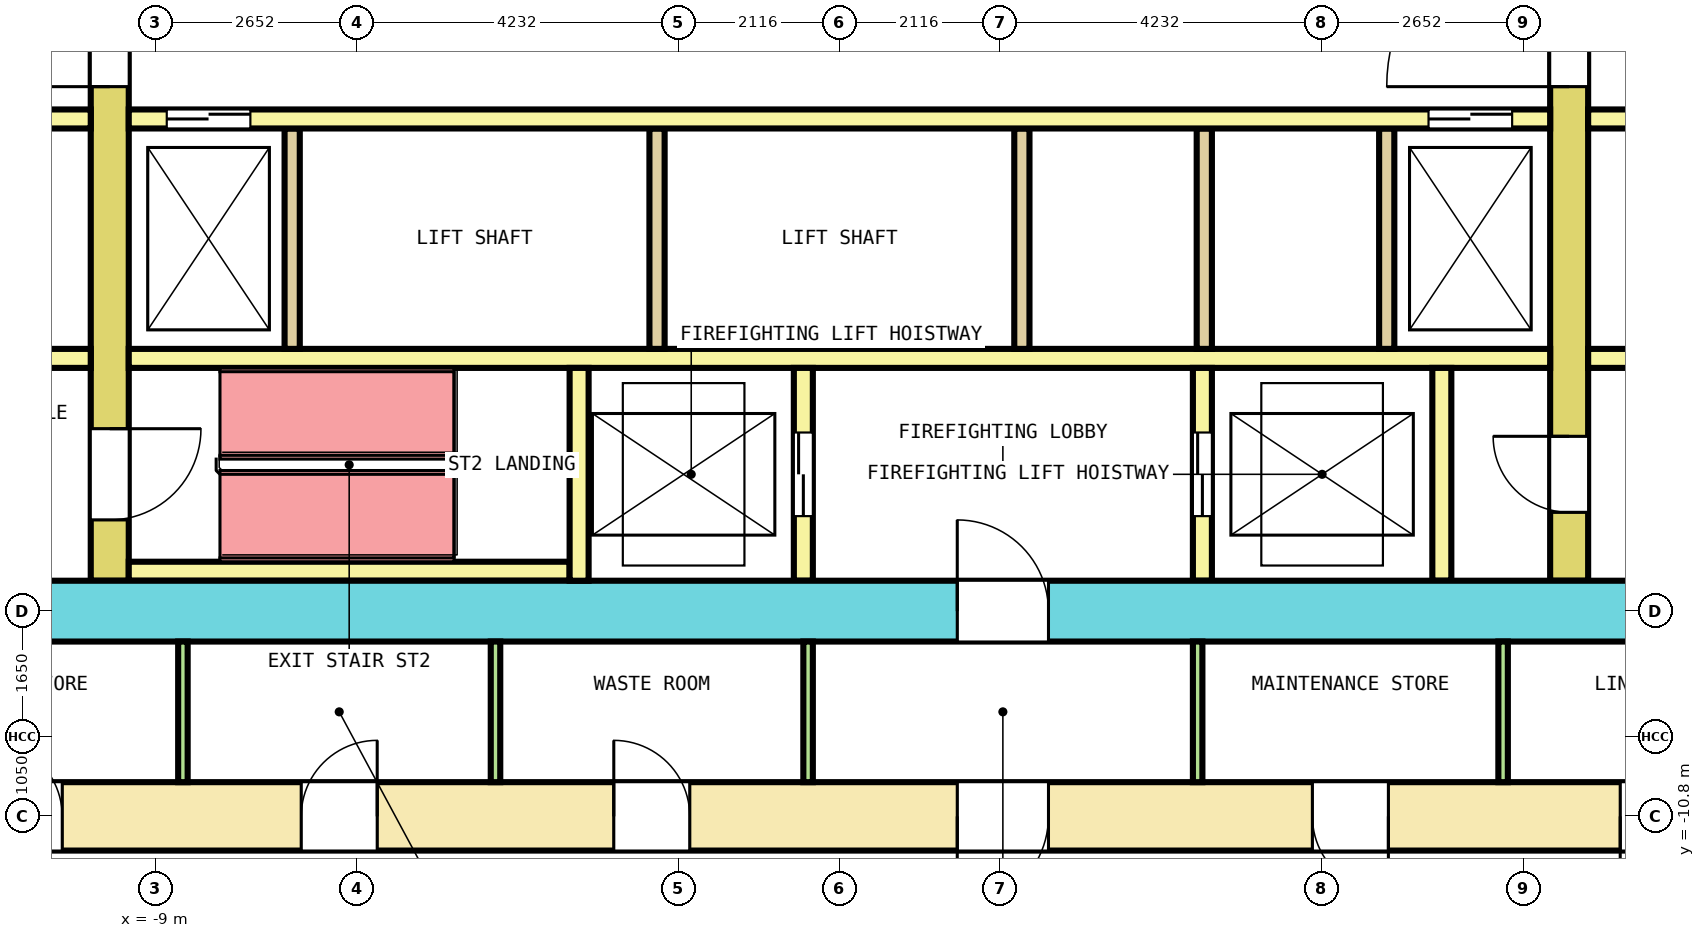
"""IFC4 building model, lengths in metres.
Left out: names, types, materials, properties, quantities, classifications, styles, units other than length and angle.
Written with IfcOpenShell. Run it as: python <this file> out.ifc"""

import sys

from ifc_helpers import new_model, si_unit, direction, frame, frame_2d, origin, place, context, subcontext, project, spatial, rectangle, extrude, element, fill, save


model = new_model("IFC4")
c1 = context("Model", 3, precision=1e-05, world=origin(), true_north=direction((0.0, 1.0)))
c2 = subcontext(c1, "Body", "Model", "MODEL_VIEW")
j1 = project(units=[si_unit("LENGTHUNIT", "METRE"), si_unit("PLANEANGLEUNIT", "RADIAN")], contexts=[c1])
p1 = place(None, origin())
s1 = spatial("IfcSite", under=j1, at=p1, CompositionType="ELEMENT")
p2 = place(p1, origin())
s2 = spatial("IfcBuilding", under=s1, at=p2, CompositionType="ELEMENT")
p3 = place(p2, frame((0.0, 0.0, 67.4)))
s3 = spatial("IfcBuildingStorey", under=s2, at=p3, CompositionType="ELEMENT", Elevation=67.4)
p4 = place(p3, frame((-13.65, -10.8, 0.0), z_axis=(0.0, 0.0, 1.0), x_axis=(1.0, 0.0, 0.0)))
e1 = element("IfcWall", 1, at=p4, inside=s3, PredefinedType="SHEAR", context=c2, shape_type="SweptSolid", body=[
    extrude(rectangle(XDim=27.3, YDim=0.9, at=frame_2d((13.65, 0.0))), origin(), (0.0, 0.0, 1.0), 4.1),
])
p5 = place(p4, frame((2.425, 0.0, 0.0)))
e2 = element("IfcOpeningElement", 2, at=p5, cuts=e1, PredefinedType="OPENING", context=c2, shape_type="SweptSolid", body=[
    extrude(rectangle(XDim=1.0, YDim=2.1, at=frame_2d((0.5, 1.05))), frame((0.0, 0.46, 0.0), z_axis=(0.0, -1.0, 0.0), x_axis=(1.0, 0.0, 0.0)), (0.0, 0.0, 1.0), 0.92),
])
p6 = place(p4, frame((6.569, 0.0, 0.0)))
e3 = element("IfcOpeningElement", 3, at=p6, cuts=e1, PredefinedType="OPENING", context=c2, shape_type="SweptSolid", body=[
    extrude(rectangle(XDim=1.0, YDim=2.1, at=frame_2d((0.5, 1.05))), frame((0.0, 0.46, 0.0), z_axis=(0.0, -1.0, 0.0), x_axis=(1.0, 0.0, 0.0)), (0.0, 0.0, 1.0), 0.92),
])
p7 = place(p4, frame((10.681, 0.0, 0.0)))
e4 = element("IfcOpeningElement", 4, at=p7, cuts=e1, PredefinedType="OPENING", context=c2, shape_type="SweptSolid", body=[
    extrude(rectangle(XDim=1.0, YDim=2.1, at=frame_2d((0.5, 1.05))), frame((0.0, 0.46, 0.0), z_axis=(0.0, -1.0, 0.0), x_axis=(1.0, 0.0, 0.0)), (0.0, 0.0, 1.0), 0.92),
])
p8 = place(p4, frame((19.872, 0.0, 0.0)))
e5 = element("IfcOpeningElement", 5, at=p8, cuts=e1, PredefinedType="OPENING", context=c2, shape_type="SweptSolid", body=[
    extrude(rectangle(XDim=1.0, YDim=2.1, at=frame_2d((0.5, 1.05))), frame((0.0, 0.46, 0.0), z_axis=(0.0, -1.0, 0.0), x_axis=(1.0, 0.0, 0.0)), (0.0, 0.0, 1.0), 0.92),
])
p9 = place(p4, frame((23.922, 0.0, 0.0)))
e6 = element("IfcOpeningElement", 6, at=p9, cuts=e1, PredefinedType="OPENING", context=c2, shape_type="SweptSolid", body=[
    extrude(rectangle(XDim=1.0, YDim=2.1, at=frame_2d((0.5, 1.05))), frame((0.0, 0.46, 0.0), z_axis=(0.0, -1.0, 0.0), x_axis=(1.0, 0.0, 0.0)), (0.0, 0.0, 1.0), 0.92),
])
p10 = place(p4, frame((15.2, 0.0, 0.0)))
e7 = element("IfcOpeningElement", 7, at=p10, cuts=e1, PredefinedType="OPENING", context=c2, shape_type="SweptSolid", body=[
    extrude(rectangle(XDim=1.2, YDim=2.1, at=frame_2d((0.6, 1.05))), frame((0.0, 0.46, 0.0), z_axis=(0.0, -1.0, 0.0), x_axis=(1.0, 0.0, 0.0)), (0.0, 0.0, 1.0), 0.92),
])
p11 = place(p3, frame((-12.75, -8.1, 0.0), z_axis=(0.0, 0.0, 1.0), x_axis=(1.0, 0.0, 0.0)))
e8 = element("IfcWall", 8, at=p11, inside=s3, PredefinedType="SHEAR", context=c2, shape_type="SweptSolid", body=[
    extrude(rectangle(XDim=25.5, YDim=0.8, at=frame_2d((12.75, 0.0))), origin(), (0.0, 0.0, 1.0), 4.1),
])
p12 = place(p11, frame((14.3, 0.0, 0.0)))
e9 = element("IfcOpeningElement", 9, at=p12, cuts=e8, PredefinedType="OPENING", context=c2, shape_type="SweptSolid", body=[
    extrude(rectangle(XDim=1.2, YDim=2.1, at=frame_2d((0.6, 1.05))), frame((0.0, 0.41, 0.0), z_axis=(0.0, -1.0, 0.0), x_axis=(1.0, 0.0, 0.0)), (0.0, 0.0, 1.0), 0.82),
])
p13 = place(p3, frame((-9.6, -7.7, 0.0), z_axis=(0.0, 0.0, 1.0), x_axis=(0.0, 1.0, 0.0)))
e10 = element("IfcWall", 10, at=p13, inside=s3, PredefinedType="SHEAR", context=c2, shape_type="SweptSolid", body=[
    extrude(rectangle(XDim=15.4, YDim=0.5, at=frame_2d((7.7, 0.0))), origin(), (0.0, 0.0, 1.0), 4.1),
])
p14 = place(p13, frame((6.5, 0.0, 0.0)))
e11 = element("IfcOpeningElement", 11, at=p14, cuts=e10, PredefinedType="OPENING", context=c2, shape_type="SweptSolid", body=[
    extrude(rectangle(XDim=2.4, YDim=2.1, at=frame_2d((1.2, 1.05))), frame((0.0, 0.26, 0.0), z_axis=(0.0, -1.0, 0.0), x_axis=(1.0, 0.0, 0.0)), (0.0, 0.0, 1.0), 0.52),
])
p15 = place(p13, frame((13.4, 0.0, 0.0)))
e12 = element("IfcOpeningElement", 12, at=p15, cuts=e10, PredefinedType="OPENING", context=c2, shape_type="SweptSolid", body=[
    extrude(rectangle(XDim=1.2, YDim=2.1, at=frame_2d((0.6, 1.05))), frame((0.0, 0.26, 0.0), z_axis=(0.0, -1.0, 0.0), x_axis=(1.0, 0.0, 0.0)), (0.0, 0.0, 1.0), 0.52),
])
p16 = place(p13, frame((0.8, 0.0, 0.0)))
e13 = element("IfcOpeningElement", 13, at=p16, cuts=e10, PredefinedType="OPENING", context=c2, shape_type="SweptSolid", body=[
    extrude(rectangle(XDim=1.2, YDim=2.1, at=frame_2d((0.6, 1.05))), frame((0.0, 0.26, 0.0), z_axis=(0.0, -1.0, 0.0), x_axis=(1.0, 0.0, 0.0)), (0.0, 0.0, 1.0), 0.52),
])
p17 = place(p3, frame((9.6, -7.7, 0.0), z_axis=(0.0, 0.0, 1.0), x_axis=(0.0, 1.0, 0.0)))
e14 = element("IfcWall", 14, at=p17, inside=s3, PredefinedType="SHEAR", context=c2, shape_type="SweptSolid", body=[
    extrude(rectangle(XDim=15.4, YDim=0.5, at=frame_2d((7.7, 0.0))), origin(), (0.0, 0.0, 1.0), 4.1),
])
p18 = place(p17, frame((6.5, 0.0, 0.0)))
e15 = element("IfcOpeningElement", 15, at=p18, cuts=e14, PredefinedType="OPENING", context=c2, shape_type="SweptSolid", body=[
    extrude(rectangle(XDim=2.4, YDim=2.1, at=frame_2d((1.2, 1.05))), frame((0.0, 0.26, 0.0), z_axis=(0.0, -1.0, 0.0), x_axis=(1.0, 0.0, 0.0)), (0.0, 0.0, 1.0), 0.52),
])
p19 = place(p17, frame((13.4, 0.0, 0.0)))
e16 = element("IfcOpeningElement", 16, at=p19, cuts=e14, PredefinedType="OPENING", context=c2, shape_type="SweptSolid", body=[
    extrude(rectangle(XDim=1.2, YDim=2.1, at=frame_2d((0.6, 1.05))), frame((0.0, 0.26, 0.0), z_axis=(0.0, -1.0, 0.0), x_axis=(1.0, 0.0, 0.0)), (0.0, 0.0, 1.0), 0.52),
])
p20 = place(p17, frame((0.9, 0.0, 0.0)))
e17 = element("IfcOpeningElement", 17, at=p20, cuts=e14, PredefinedType="OPENING", context=c2, shape_type="SweptSolid", body=[
    extrude(rectangle(XDim=1.0, YDim=2.1, at=frame_2d((0.5, 1.05))), frame((0.0, 0.26, 0.0), z_axis=(0.0, -1.0, 0.0), x_axis=(1.0, 0.0, 0.0)), (0.0, 0.0, 1.0), 0.52),
])
p21 = place(p3, frame((-12.75, -1.625, 0.0), z_axis=(0.0, 0.0, 1.0), x_axis=(1.0, 0.0, 0.0)))
e18 = element("IfcWall", 18, at=p21, inside=s3, PredefinedType="SOLIDWALL", context=c2, shape_type="SweptSolid", body=[
    extrude(rectangle(XDim=2.9, YDim=0.25, at=frame_2d((1.45, 0.0))), origin(), (0.0, 0.0, 1.0), 4.1),
])
p22 = place(p21, frame((0.9, 0.0, 0.0)))
e19 = element("IfcOpeningElement", 19, at=p22, cuts=e18, PredefinedType="OPENING", context=c2, shape_type="SweptSolid", body=[
    extrude(rectangle(XDim=1.1, YDim=2.1, at=frame_2d((0.55, 1.05))), frame((0.0, 0.135, 0.0), z_axis=(0.0, -1.0, 0.0), x_axis=(1.0, 0.0, 0.0)), (0.0, 0.0, 1.0), 0.27),
])
p23 = place(p3, frame((-9.35, -1.625, 0.0), z_axis=(0.0, 0.0, 1.0), x_axis=(1.0, 0.0, 0.0)))
e20 = element("IfcWall", 20, at=p23, inside=s3, PredefinedType="SOLIDWALL", context=c2, shape_type="SweptSolid", body=[
    extrude(rectangle(XDim=18.7, YDim=0.25, at=frame_2d((9.35, 0.0))), origin(), (0.0, 0.0, 1.0), 4.1),
])
p24 = place(p23, frame((0.5, 0.0, 0.0)))
e21 = element("IfcOpeningElement", 21, at=p24, cuts=e20, PredefinedType="OPENING", context=c2, shape_type="SweptSolid", body=[
    extrude(rectangle(XDim=1.1, YDim=2.1, at=frame_2d((0.55, 1.05))), frame((0.0, 0.135, 0.0), z_axis=(0.0, -1.0, 0.0), x_axis=(1.0, 0.0, 0.0)), (0.0, 0.0, 1.0), 0.27),
])
p25 = place(p23, frame((17.1, 0.0, 0.0)))
e22 = element("IfcOpeningElement", 22, at=p25, cuts=e20, PredefinedType="OPENING", context=c2, shape_type="SweptSolid", body=[
    extrude(rectangle(XDim=1.1, YDim=2.1, at=frame_2d((0.55, 1.05))), frame((0.0, 0.135, 0.0), z_axis=(0.0, -1.0, 0.0), x_axis=(1.0, 0.0, 0.0)), (0.0, 0.0, 1.0), 0.27),
])
p26 = place(p3, frame((9.85, -1.625, 0.0), z_axis=(0.0, 0.0, 1.0), x_axis=(1.0, 0.0, 0.0)))
e23 = element("IfcWall", 23, at=p26, inside=s3, PredefinedType="SOLIDWALL", context=c2, shape_type="SweptSolid", body=[
    extrude(rectangle(XDim=2.9, YDim=0.25, at=frame_2d((1.45, 0.0))), origin(), (0.0, 0.0, 1.0), 4.1),
])
p27 = place(p26, frame((0.9, 0.0, 0.0)))
e24 = element("IfcOpeningElement", 24, at=p27, cuts=e23, PredefinedType="OPENING", context=c2, shape_type="SweptSolid", body=[
    extrude(rectangle(XDim=1.1, YDim=2.1, at=frame_2d((0.55, 1.05))), frame((0.0, 0.135, 0.0), z_axis=(0.0, -1.0, 0.0), x_axis=(1.0, 0.0, 0.0)), (0.0, 0.0, 1.0), 0.27),
])
p28 = place(p3, frame((-12.75, -4.775, 0.0), z_axis=(0.0, 0.0, 1.0), x_axis=(1.0, 0.0, 0.0)))
e25 = element("IfcWall", 25, at=p28, inside=s3, PredefinedType="SOLIDWALL", context=c2, shape_type="SweptSolid", body=[
    extrude(rectangle(XDim=2.9, YDim=0.25, at=frame_2d((1.45, 0.0))), origin(), (0.0, 0.0, 1.0), 4.1),
])
p29 = place(p3, frame((-9.35, -4.775, 0.0), z_axis=(0.0, 0.0, 1.0), x_axis=(1.0, 0.0, 0.0)))
e26 = element("IfcWall", 26, at=p29, inside=s3, PredefinedType="SOLIDWALL", context=c2, shape_type="SweptSolid", body=[
    extrude(rectangle(XDim=18.7, YDim=0.25, at=frame_2d((9.35, 0.0))), origin(), (0.0, 0.0, 1.0), 4.1),
])
p30 = place(p3, frame((9.85, -4.775, 0.0), z_axis=(0.0, 0.0, 1.0), x_axis=(1.0, 0.0, 0.0)))
e27 = element("IfcWall", 27, at=p30, inside=s3, PredefinedType="SOLIDWALL", context=c2, shape_type="SweptSolid", body=[
    extrude(rectangle(XDim=2.9, YDim=0.25, at=frame_2d((1.45, 0.0))), origin(), (0.0, 0.0, 1.0), 4.1),
])
for number, where, z_axis, x_axis in (
    (28, (-7.2, -4.65, 0.0), (0.0, 0.0, 1.0), (0.0, 1.0, 0.0)),
    (29, (-2.4, -4.65, 0.0), (0.0, 0.0, 1.0), (0.0, 1.0, 0.0)),
    (30, (2.4, -4.65, 0.0), (0.0, 0.0, 1.0), (0.0, 1.0, 0.0)),
    (31, (4.8, -4.65, 0.0), (0.0, 0.0, 1.0), (0.0, 1.0, 0.0)),
    (32, (7.2, -4.65, 0.0), (0.0, 0.0, 1.0), (0.0, 1.0, 0.0)),
):
    element("IfcWall", number, at=place(p3, frame(where, z_axis=z_axis, x_axis=x_axis)), inside=s3, PredefinedType="SOLIDWALL", context=c2, shape_type="SweptSolid", body=[
        extrude(rectangle(XDim=2.9, YDim=0.2, at=frame_2d((1.45, 0.0))), origin(), (0.0, 0.0, 1.0), 4.1),
    ])
p31 = place(p3, frame((-9.35, -7.575, 0.0), z_axis=(0.0, 0.0, 1.0), x_axis=(1.0, 0.0, 0.0)))
e33 = element("IfcWall", 33, at=p31, inside=s3, PredefinedType="SOLIDWALL", context=c2, shape_type="SweptSolid", body=[
    extrude(rectangle(XDim=5.8, YDim=0.25, at=frame_2d((2.9, 0.0))), origin(), (0.0, 0.0, 1.0), 4.1),
])
p32 = place(p3, frame((-3.425, -7.7, 0.0), z_axis=(0.0, 0.0, 1.0), x_axis=(0.0, 1.0, 0.0)))
e34 = element("IfcWall", 34, at=p32, inside=s3, PredefinedType="SOLIDWALL", context=c2, shape_type="SweptSolid", body=[
    extrude(rectangle(XDim=2.8, YDim=0.25, at=frame_2d((1.4, 0.0))), origin(), (0.0, 0.0, 1.0), 4.1),
])
p33 = place(p3, frame((-0.475, -7.7, 0.0), z_axis=(0.0, 0.0, 1.0), x_axis=(0.0, 1.0, 0.0)))
e35 = element("IfcWall", 35, at=p33, inside=s3, PredefinedType="SOLIDWALL", context=c2, shape_type="SweptSolid", body=[
    extrude(rectangle(XDim=2.8, YDim=0.25, at=frame_2d((1.4, 0.0))), origin(), (0.0, 0.0, 1.0), 4.1),
])
p34 = place(p33, frame((0.85, 0.0, 0.0)))
e36 = element("IfcOpeningElement", 36, at=p34, cuts=e35, PredefinedType="OPENING", context=c2, shape_type="SweptSolid", body=[
    extrude(rectangle(XDim=1.1, YDim=2.1, at=frame_2d((0.55, 1.05))), frame((0.0, 0.135, 0.0), z_axis=(0.0, -1.0, 0.0), x_axis=(1.0, 0.0, 0.0)), (0.0, 0.0, 1.0), 0.27),
])
p35 = place(p3, frame((4.775, -7.7, 0.0), z_axis=(0.0, 0.0, 1.0), x_axis=(0.0, 1.0, 0.0)))
e37 = element("IfcWall", 37, at=p35, inside=s3, PredefinedType="SOLIDWALL", context=c2, shape_type="SweptSolid", body=[
    extrude(rectangle(XDim=2.8, YDim=0.25, at=frame_2d((1.4, 0.0))), origin(), (0.0, 0.0, 1.0), 4.1),
])
p36 = place(p35, frame((0.85, 0.0, 0.0)))
e38 = element("IfcOpeningElement", 38, at=p36, cuts=e37, PredefinedType="OPENING", context=c2, shape_type="SweptSolid", body=[
    extrude(rectangle(XDim=1.1, YDim=2.1, at=frame_2d((0.55, 1.05))), frame((0.0, 0.135, 0.0), z_axis=(0.0, -1.0, 0.0), x_axis=(1.0, 0.0, 0.0)), (0.0, 0.0, 1.0), 0.27),
])
p37 = place(p3, frame((7.925, -7.7, 0.0), z_axis=(0.0, 0.0, 1.0), x_axis=(0.0, 1.0, 0.0)))
e39 = element("IfcWall", 39, at=p37, inside=s3, PredefinedType="SOLIDWALL", context=c2, shape_type="SweptSolid", body=[
    extrude(rectangle(XDim=2.8, YDim=0.25, at=frame_2d((1.4, 0.0))), origin(), (0.0, 0.0, 1.0), 4.1),
])
for number, where, z_axis, x_axis in (
    (40, (-8.637, -10.35, 0.0), (0.0, 0.0, 1.0), (0.0, 1.0, 0.0)),
    (41, (-4.525, -10.35, 0.0), (0.0, 0.0, 1.0), (0.0, 1.0, 0.0)),
    (42, (-0.413, -10.35, 0.0), (0.0, 0.0, 1.0), (0.0, 1.0, 0.0)),
    (43, (4.712, -10.35, 0.0), (0.0, 0.0, 1.0), (0.0, 1.0, 0.0)),
    (44, (8.731, -10.35, 0.0), (0.0, 0.0, 1.0), (0.0, 1.0, 0.0)),
):
    element("IfcWall", number, at=place(p3, frame(where, z_axis=z_axis, x_axis=x_axis)), inside=s3, PredefinedType="PARTITIONING", context=c2, shape_type="SweptSolid", body=[
        extrude(rectangle(XDim=1.85, YDim=0.125, at=frame_2d((0.925, 0.0))), origin(), (0.0, 0.0, 1.0), 4.1),
    ])
p38 = place(p24, origin())
e45 = element("IfcDoor", 45, at=p38, inside=s3, OperationType="DOUBLE_DOOR_SLIDING", PredefinedType="DOOR", context=c2, shape_type="SweptSolid", body=[
    extrude(rectangle(XDim=1.1, YDim=2.1, at=frame_2d((0.55, 1.05))), frame((0.0, 0.075, 0.0), z_axis=(0.0, -1.0, 0.0), x_axis=(1.0, 0.0, 0.0)), (0.0, 0.0, 1.0), 0.15),
])
fill(e21, e45)
p39 = place(p25, origin())
e46 = element("IfcDoor", 46, at=p39, inside=s3, OperationType="DOUBLE_DOOR_SLIDING", PredefinedType="DOOR", context=c2, shape_type="SweptSolid", body=[
    extrude(rectangle(XDim=1.1, YDim=2.1, at=frame_2d((0.55, 1.05))), frame((0.0, 0.075, 0.0), z_axis=(0.0, -1.0, 0.0), x_axis=(1.0, 0.0, 0.0)), (0.0, 0.0, 1.0), 0.15),
])
fill(e22, e46)
p40 = place(p34, origin())
e47 = element("IfcDoor", 47, at=p40, inside=s3, OperationType="DOUBLE_DOOR_SLIDING", PredefinedType="DOOR", context=c2, shape_type="SweptSolid", body=[
    extrude(rectangle(XDim=1.1, YDim=2.1, at=frame_2d((0.55, 1.05))), frame((0.0, 0.075, 0.0), z_axis=(0.0, -1.0, 0.0), x_axis=(1.0, 0.0, 0.0)), (0.0, 0.0, 1.0), 0.15),
])
fill(e36, e47)
p41 = place(p36, origin())
e48 = element("IfcDoor", 48, at=p41, inside=s3, OperationType="DOUBLE_DOOR_SLIDING", PredefinedType="DOOR", context=c2, shape_type="SweptSolid", body=[
    extrude(rectangle(XDim=1.1, YDim=2.1, at=frame_2d((0.55, 1.05))), frame((0.0, 0.075, 0.0), z_axis=(0.0, -1.0, 0.0), x_axis=(1.0, 0.0, 0.0)), (0.0, 0.0, 1.0), 0.15),
])
fill(e38, e48)
p42 = place(p14, origin())
e49 = element("IfcDoor", 49, at=p42, inside=s3, OperationType="DOUBLE_DOOR_SINGLE_SWING", PredefinedType="DOOR", context=c2, shape_type="SweptSolid", body=[
    extrude(rectangle(XDim=2.4, YDim=2.1, at=frame_2d((1.2, 1.05))), frame((0.0, 0.2, 0.0), z_axis=(0.0, -1.0, 0.0), x_axis=(1.0, 0.0, 0.0)), (0.0, 0.0, 1.0), 0.4),
])
fill(e11, e49)
p43 = place(p18, origin())
e50 = element("IfcDoor", 50, at=p43, inside=s3, OperationType="DOUBLE_DOOR_SINGLE_SWING", PredefinedType="DOOR", context=c2, shape_type="SweptSolid", body=[
    extrude(rectangle(XDim=2.4, YDim=2.1, at=frame_2d((1.2, 1.05))), frame((0.0, 0.2, 0.0), z_axis=(0.0, -1.0, 0.0), x_axis=(1.0, 0.0, 0.0)), (0.0, 0.0, 1.0), 0.4),
])
fill(e15, e50)
p44 = place(p16, origin())
e51 = element("IfcDoor", 51, at=p44, inside=s3, OperationType="SINGLE_SWING_LEFT", PredefinedType="DOOR", context=c2, shape_type="SweptSolid", body=[
    extrude(rectangle(XDim=1.2, YDim=2.1, at=frame_2d((0.6, 1.05))), frame((0.0, 0.2, 0.0), z_axis=(0.0, -1.0, 0.0), x_axis=(1.0, 0.0, 0.0)), (0.0, 0.0, 1.0), 0.4),
])
fill(e13, e51)
p45 = place(p12, origin())
e52 = element("IfcDoor", 52, at=p45, inside=s3, OperationType="SINGLE_SWING_LEFT", PredefinedType="DOOR", context=c2, shape_type="SweptSolid", body=[
    extrude(rectangle(XDim=1.2, YDim=2.1, at=frame_2d((0.6, 1.05))), frame((0.0, 0.3, 0.0), z_axis=(0.0, -1.0, 0.0), x_axis=(1.0, 0.0, 0.0)), (0.0, 0.0, 1.0), 0.6),
])
fill(e9, e52)
p46 = place(p20, origin())
e53 = element("IfcDoor", 53, at=p46, inside=s3, OperationType="SINGLE_SWING_LEFT", PredefinedType="DOOR", context=c2, shape_type="SweptSolid", body=[
    extrude(rectangle(XDim=1.0, YDim=2.1, at=frame_2d((0.5, 1.05))), frame((0.0, 0.2, 0.0), z_axis=(0.0, -1.0, 0.0), x_axis=(1.0, 0.0, 0.0)), (0.0, 0.0, 1.0), 0.4),
])
fill(e17, e53)
p47 = place(p5, origin())
e54 = element("IfcDoor", 54, at=p47, inside=s3, OperationType="SINGLE_SWING_RIGHT", PredefinedType="DOOR", context=c2, shape_type="SweptSolid", body=[
    extrude(rectangle(XDim=1.0, YDim=2.1, at=frame_2d((0.5, 1.05))), frame((0.0, 0.3, 0.0), z_axis=(0.0, -1.0, 0.0), x_axis=(1.0, 0.0, 0.0)), (0.0, 0.0, 1.0), 0.6),
])
fill(e2, e54)
p48 = place(p6, origin())
e55 = element("IfcDoor", 55, at=p48, inside=s3, OperationType="SINGLE_SWING_LEFT", PredefinedType="DOOR", context=c2, shape_type="SweptSolid", body=[
    extrude(rectangle(XDim=1.0, YDim=2.1, at=frame_2d((0.5, 1.05))), frame((0.0, 0.3, 0.0), z_axis=(0.0, -1.0, 0.0), x_axis=(1.0, 0.0, 0.0)), (0.0, 0.0, 1.0), 0.6),
])
fill(e3, e55)
p49 = place(p7, origin())
e56 = element("IfcDoor", 56, at=p49, inside=s3, OperationType="SINGLE_SWING_RIGHT", PredefinedType="DOOR", context=c2, shape_type="SweptSolid", body=[
    extrude(rectangle(XDim=1.0, YDim=2.1, at=frame_2d((0.5, 1.05))), frame((0.0, 0.3, 0.0), z_axis=(0.0, -1.0, 0.0), x_axis=(1.0, 0.0, 0.0)), (0.0, 0.0, 1.0), 0.6),
])
fill(e4, e56)
p50 = place(p8, origin())
e57 = element("IfcDoor", 57, at=p50, inside=s3, OperationType="SINGLE_SWING_LEFT", PredefinedType="DOOR", context=c2, shape_type="SweptSolid", body=[
    extrude(rectangle(XDim=1.0, YDim=2.1, at=frame_2d((0.5, 1.05))), frame((0.0, 0.3, 0.0), z_axis=(0.0, -1.0, 0.0), x_axis=(1.0, 0.0, 0.0)), (0.0, 0.0, 1.0), 0.6),
])
fill(e5, e57)
p51 = place(p9, origin())
e58 = element("IfcDoor", 58, at=p51, inside=s3, OperationType="SINGLE_SWING_RIGHT", PredefinedType="DOOR", context=c2, shape_type="SweptSolid", body=[
    extrude(rectangle(XDim=1.0, YDim=2.1, at=frame_2d((0.5, 1.05))), frame((0.0, 0.3, 0.0), z_axis=(0.0, -1.0, 0.0), x_axis=(1.0, 0.0, 0.0)), (0.0, 0.0, 1.0), 0.6),
])
fill(e6, e58)
p52 = place(p10, origin())
e59 = element("IfcDoor", 59, at=p52, inside=s3, OperationType="SINGLE_SWING_LEFT", PredefinedType="DOOR", context=c2, shape_type="SweptSolid", body=[
    extrude(rectangle(XDim=1.2, YDim=2.1, at=frame_2d((0.6, 1.05))), frame((0.0, 0.3, 0.0), z_axis=(0.0, -1.0, 0.0), x_axis=(1.0, 0.0, 0.0)), (0.0, 0.0, 1.0), 0.6),
])
fill(e7, e59)
save(model, sys.argv[1])
